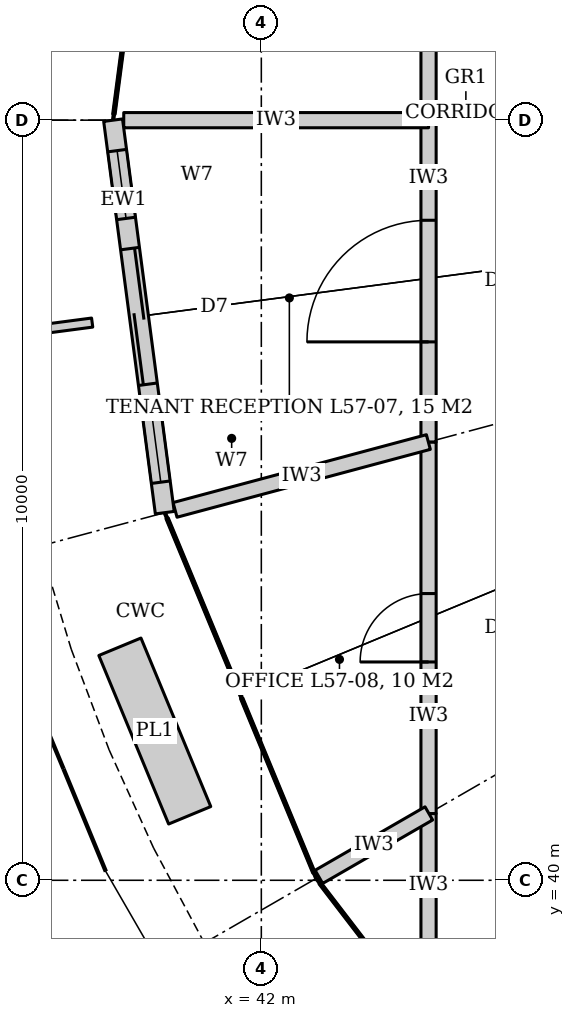
"""IFC4 building model, lengths in metres.
Left out: names, types, materials, properties, quantities, classifications, styles, units other than length and angle.
Written with IfcOpenShell. Run it as: python <this file> out.ifc"""

import sys

from ifc_helpers import new_model, si_unit, direction, frame, frame_2d, origin, place, context, subcontext, project, spatial, rectangle, extrude, element, fill, save


model = new_model("IFC4")
c1 = context("Model", 3, precision=1e-05, world=origin(), true_north=direction((0.0, 1.0)))
c2 = subcontext(c1, "Body", "Model", "MODEL_VIEW")
j1 = project(units=[si_unit("LENGTHUNIT", "METRE"), si_unit("PLANEANGLEUNIT", "RADIAN")], contexts=[c1])
p1 = place(None, origin())
s1 = spatial("IfcSite", under=j1, at=p1, CompositionType="ELEMENT")
p2 = place(p1, origin())
s2 = spatial("IfcBuilding", under=s1, at=p2, CompositionType="ELEMENT")
p3 = place(p2, frame((0.0, 0.0, 240.2)))
s3 = spatial("IfcBuildingStorey", under=s2, at=p3, CompositionType="ELEMENT", Elevation=240.2)
p4 = place(p3, frame((44.2, 39.0, 0.0), z_axis=(0.0, 0.0, 1.0), x_axis=(0.0, 1.0, 0.0)))
e1 = element("IfcWall", 1, at=p4, inside=s3, PredefinedType="PARTITIONING", context=c2, shape_type="SweptSolid", body=[
    extrude(rectangle(XDim=1.878, YDim=0.2, at=frame_2d((0.939, 0.0))), origin(), (0.0, 0.0, 1.0), 3.02),
])
p5 = place(p3, frame((44.2, 40.878, 0.0), z_axis=(0.0, 0.0, 1.0), x_axis=(0.0, 1.0, 0.0)))
e2 = element("IfcWall", 2, at=p5, inside=s3, PredefinedType="PARTITIONING", context=c2, shape_type="SweptSolid", body=[
    extrude(rectangle(XDim=4.888, YDim=0.2, at=frame_2d((2.444, 0.0))), origin(), (0.0, 0.0, 1.0), 3.02),
])
p6 = place(p5, frame((1.994, 0.0, 0.0)))
e3 = element("IfcOpeningElement", 3, at=p6, cuts=e2, PredefinedType="OPENING", context=c2, shape_type="SweptSolid", body=[
    extrude(rectangle(XDim=0.9, YDim=2.4, at=frame_2d((0.45, 1.2))), frame((0.0, 0.11, 0.0), z_axis=(0.0, -1.0, 0.0), x_axis=(1.0, 0.0, 0.0)), (0.0, 0.0, 1.0), 0.22),
])
p7 = place(p3, frame((44.2, 45.766, 0.0), z_axis=(0.0, 0.0, 1.0), x_axis=(0.0, 1.0, 0.0)))
e4 = element("IfcWall", 4, at=p7, inside=s3, PredefinedType="PARTITIONING", context=c2, shape_type="SweptSolid", body=[
    extrude(rectangle(XDim=4.234, YDim=0.2, at=frame_2d((2.117, 0.0))), origin(), (0.0, 0.0, 1.0), 3.02),
])
p8 = place(p7, frame((1.317, 0.0, 0.0)))
e5 = element("IfcOpeningElement", 5, at=p8, cuts=e4, PredefinedType="OPENING", context=c2, shape_type="SweptSolid", body=[
    extrude(rectangle(XDim=1.6, YDim=2.4, at=frame_2d((0.8, 1.2))), frame((0.0, 0.11, 0.0), z_axis=(0.0, -1.0, 0.0), x_axis=(1.0, 0.0, 0.0)), (0.0, 0.0, 1.0), 0.22),
])
p9 = place(p3, frame((44.2, 50.0, 0.0), z_axis=(0.0, 0.0, 1.0), x_axis=(0.0, 1.0, 0.0)))
e6 = element("IfcWall", 6, at=p9, inside=s3, PredefinedType="PARTITIONING", context=c2, shape_type="SweptSolid", body=[
    extrude(rectangle(XDim=8.8, YDim=0.2, at=frame_2d((4.4, 0.0))), origin(), (0.0, 0.0, 1.0), 3.02),
])
p10 = place(p3, frame((44.2, 50.0, 0.0), z_axis=(0.0, 0.0, 1.0), x_axis=(-1.0, 0.0, 0.0)))
e7 = element("IfcWall", 7, at=p10, inside=s3, PredefinedType="PARTITIONING", context=c2, shape_type="SweptSolid", body=[
    extrude(rectangle(XDim=4.085, YDim=0.2, at=frame_2d((2.042, 0.0))), origin(), (0.0, 0.0, 1.0), 3.02),
])
p11 = place(p3, frame((44.198, 45.766, 0.0), z_axis=(0.0, 0.0, 1.0), x_axis=(-0.965944651358, -0.258748778768, 0.0)))
e8 = element("IfcWall", 8, at=p11, inside=s3, PredefinedType="PARTITIONING", context=c2, shape_type="SweptSolid", body=[
    extrude(rectangle(XDim=3.525, YDim=0.2, at=frame_2d((1.763, 0.0))), origin(), (0.0, 0.0, 1.0), 3.02),
])
p12 = place(p3, frame((44.204, 40.88, 0.0), z_axis=(0.0, 0.0, 1.0), x_axis=(-0.866073756611, -0.499916241094, 0.0)))
e9 = element("IfcWall", 9, at=p12, inside=s3, PredefinedType="PARTITIONING", context=c2, shape_type="SweptSolid", body=[
    extrude(rectangle(XDim=1.745, YDim=0.2, at=frame_2d((0.873, 0.0))), origin(), (0.0, 0.0, 1.0), 3.02),
])
p13 = place(p3, frame((39.975, 50.0, 0.0), z_axis=(0.0, 0.0, 1.0), x_axis=(0.130487131216, -0.99145000307, 0.0)))
e10 = element("IfcWall", 10, at=p13, inside=s3, PredefinedType="SOLIDWALL", context=c2, shape_type="SweptSolid", body=[
    extrude(rectangle(XDim=5.228, YDim=0.25, at=frame_2d((2.614, 0.0))), origin(), (0.0, 0.0, 1.0), 4.04),
])
p14 = place(p13, frame((1.714, 0.0, 0.0)))
e11 = element("IfcOpeningElement", 11, at=p14, cuts=e10, PredefinedType="OPENING", context=c2, shape_type="SweptSolid", body=[
    extrude(rectangle(XDim=1.8, YDim=2.4, at=frame_2d((0.9, 1.2))), frame((0.0, 0.135, 0.0), z_axis=(0.0, -1.0, 0.0), x_axis=(1.0, 0.0, 0.0)), (0.0, 0.0, 1.0), 0.27),
])
p15 = place(p13, frame((0.414, 0.0, 0.0)))
e12 = element("IfcOpeningElement", 12, at=p15, cuts=e10, PredefinedType="OPENING", context=c2, shape_type="SweptSolid", body=[
    extrude(rectangle(XDim=0.9, YDim=2.4, at=frame_2d((0.45, 1.2))), frame((0.0, 0.135, 0.0), z_axis=(0.0, -1.0, 0.0), x_axis=(1.0, 0.0, 0.0)), (0.0, 0.0, 1.0), 0.27),
])
p16 = place(p13, frame((3.914, 0.0, 0.0)))
e13 = element("IfcOpeningElement", 13, at=p16, cuts=e10, PredefinedType="OPENING", context=c2, shape_type="SweptSolid", body=[
    extrude(rectangle(XDim=0.9, YDim=2.4, at=frame_2d((0.45, 1.2))), frame((0.0, 0.135, 0.0), z_axis=(0.0, -1.0, 0.0), x_axis=(1.0, 0.0, 0.0)), (0.0, 0.0, 1.0), 0.27),
])
p17 = place(p8, origin())
e14 = element("IfcDoor", 14, at=p17, inside=s3, OperationType="DOUBLE_DOOR_DOUBLE_SWING", PredefinedType="DOOR", context=c2, shape_type="SweptSolid", body=[
    extrude(rectangle(XDim=1.6, YDim=2.4, at=frame_2d((0.8, 1.2))), frame((0.0, 0.025, 0.0), z_axis=(0.0, -1.0, 0.0), x_axis=(1.0, 0.0, 0.0)), (0.0, 0.0, 1.0), 0.05),
])
fill(e5, e14)
p18 = place(p6, origin())
e15 = element("IfcDoor", 15, at=p18, inside=s3, OperationType="SINGLE_SWING_LEFT", PredefinedType="DOOR", context=c2, shape_type="SweptSolid", body=[
    extrude(rectangle(XDim=0.9, YDim=2.4, at=frame_2d((0.45, 1.2))), frame((0.0, 0.025, 0.0), z_axis=(0.0, -1.0, 0.0), x_axis=(1.0, 0.0, 0.0)), (0.0, 0.0, 1.0), 0.05),
])
fill(e3, e15)
p19 = place(p14, origin())
e16 = element("IfcDoor", 16, at=p19, inside=s3, OperationType="DOUBLE_DOOR_SLIDING", PredefinedType="DOOR", context=c2, shape_type="SweptSolid", body=[
    extrude(rectangle(XDim=1.8, YDim=2.4, at=frame_2d((0.9, 1.2))), frame((0.0, 0.025, 0.0), z_axis=(0.0, -1.0, 0.0), x_axis=(1.0, 0.0, 0.0)), (0.0, 0.0, 1.0), 0.05),
])
fill(e11, e16)
p20 = place(p15, origin())
e17 = element("IfcWindow", 17, at=p20, inside=s3, PartitioningType="SINGLE_PANEL", PredefinedType="WINDOW", context=c2, shape_type="SweptSolid", body=[
    extrude(rectangle(XDim=0.9, YDim=2.4, at=frame_2d((0.45, 1.2))), frame((0.0, 0.03, 0.0), z_axis=(0.0, -1.0, 0.0), x_axis=(1.0, 0.0, 0.0)), (0.0, 0.0, 1.0), 0.06),
])
fill(e12, e17)
p21 = place(p16, origin())
e18 = element("IfcWindow", 18, at=p21, inside=s3, PartitioningType="SINGLE_PANEL", PredefinedType="WINDOW", context=c2, shape_type="SweptSolid", body=[
    extrude(rectangle(XDim=0.9, YDim=2.4, at=frame_2d((0.45, 1.2))), frame((0.0, 0.03, 0.0), z_axis=(0.0, -1.0, 0.0), x_axis=(1.0, 0.0, 0.0)), (0.0, 0.0, 1.0), 0.06),
])
fill(e13, e18)
save(model, sys.argv[1])
